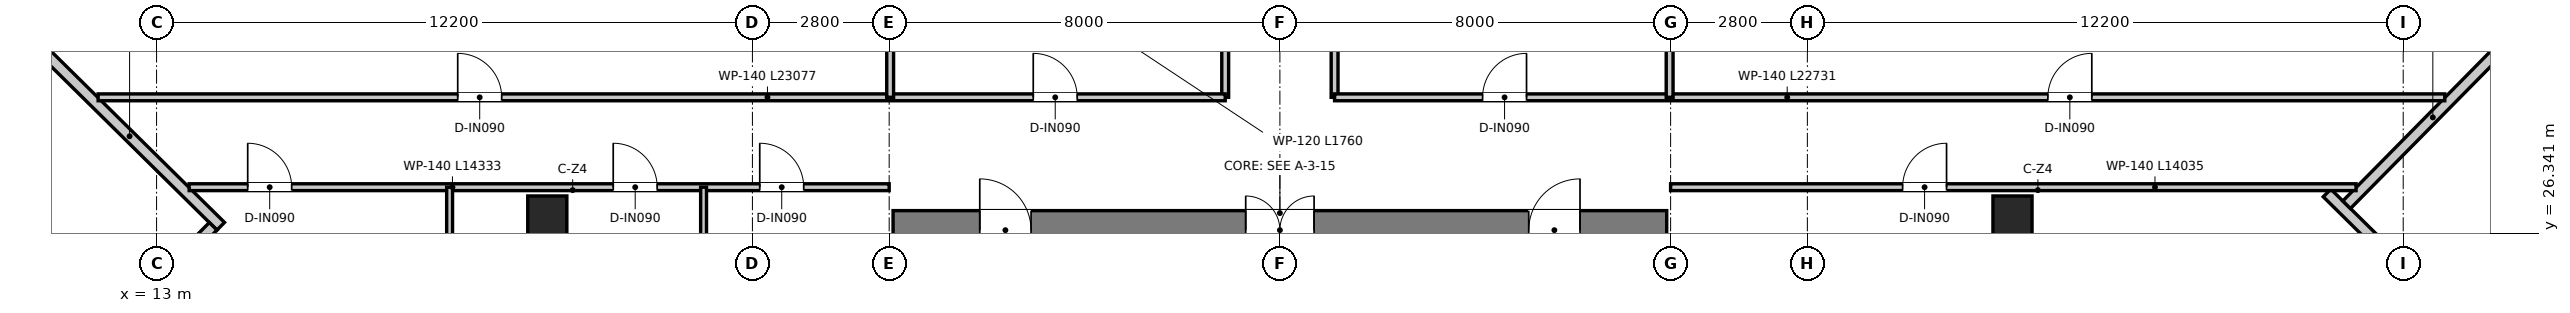
"""IFC4 building model, lengths in metres.
Left out: names, types, materials, properties, quantities, classifications, styles, units other than length and angle.
Written with IfcOpenShell. Run it as: python <this file> out.ifc"""

import sys

from ifc_helpers import new_model, si_unit, direction, frame, frame_2d, origin, origin_2d, place, context, subcontext, project, spatial, rectangle, extrude, source, transform, mapped, element, fill, save


model = new_model("IFC4")
c1 = context("Model", 3, precision=1e-05, world=origin(), true_north=direction((0.0, 1.0)))
c2 = subcontext(c1, "Body", "Model", "MODEL_VIEW")
j1 = project(units=[si_unit("LENGTHUNIT", "METRE"), si_unit("PLANEANGLEUNIT", "RADIAN")], contexts=[c1])
p1 = place(None, origin())
s1 = spatial("IfcSite", under=j1, at=p1, CompositionType="ELEMENT")
p2 = place(p1, origin())
s2 = spatial("IfcBuilding", under=s1, at=p2, CompositionType="ELEMENT")
p3 = place(p2, frame((0.0, 0.0, 231.0)))
s3 = spatial("IfcBuildingStorey", under=s2, at=p3, CompositionType="ELEMENT", Elevation=231.0)
p4 = place(p3, frame((28.08, 26.4, 0.0), z_axis=(0.0, 0.0, 1.0), x_axis=(1.0, 0.0, 0.0)))
e1 = element("IfcWall", 1, at=p4, inside=s3, PredefinedType="SHEAR", context=c2, shape_type="SweptSolid", body=[
    extrude(rectangle(XDim=15.84, YDim=0.8, at=frame_2d((7.92, 0.0))), origin(), (0.0, 0.0, 1.0), 3.95),
])
p5 = place(p4, frame((7.22, 0.0, 0.0)))
e2 = element("IfcOpeningElement", 2, at=p5, cuts=e1, PredefinedType="OPENING", context=c2, shape_type="SweptSolid", body=[
    extrude(rectangle(XDim=1.4, YDim=2.2, at=frame_2d((0.7, 1.1))), frame((0.0, 0.41, 0.0), z_axis=(0.0, -1.0, 0.0), x_axis=(1.0, 0.0, 0.0)), (0.0, 0.0, 1.0), 0.82),
])
p6 = place(p4, frame((1.775, 0.0, 0.0)))
e3 = element("IfcOpeningElement", 3, at=p6, cuts=e1, PredefinedType="OPENING", context=c2, shape_type="SweptSolid", body=[
    extrude(rectangle(XDim=1.05, YDim=2.1, at=frame_2d((0.525, 1.05))), frame((0.0, 0.41, 0.0), z_axis=(0.0, -1.0, 0.0), x_axis=(1.0, 0.0, 0.0)), (0.0, 0.0, 1.0), 0.82),
])
p7 = place(p4, frame((13.015, 0.0, 0.0)))
e4 = element("IfcOpeningElement", 4, at=p7, cuts=e1, PredefinedType="OPENING", context=c2, shape_type="SweptSolid", body=[
    extrude(rectangle(XDim=1.05, YDim=2.1, at=frame_2d((0.525, 1.05))), frame((0.0, 0.41, 0.0), z_axis=(0.0, -1.0, 0.0), x_axis=(1.0, 0.0, 0.0)), (0.0, 0.0, 1.0), 0.82),
])
m1 = source(origin(), c2, "Body", "SweptSolid", [
    extrude(rectangle(XDim=0.8, YDim=0.8, at=origin_2d()), origin(), (0.0, 0.0, 1.0), 3.95),
])
for number, where, z_axis, x_axis in (
    (5, (21.0, 26.7, 0.0), (0.0, 0.0, 1.0), (1.0, 0.0, 0.0)),
    (6, (51.0, 26.7, 0.0), (0.0, 0.0, 1.0), (1.0, 0.0, 0.0)),
):
    element("IfcColumn", number, at=place(p3, frame(where, z_axis=z_axis, x_axis=x_axis)), inside=s3, PredefinedType="COLUMN", context=c2, shape_type="MappedRepresentation", body=[
        mapped(m1, transform((0.0, 0.0, 0.0), x_axis=(1.0, 0.0, 0.0), y_axis=(0.0, 1.0, 0.0), z_axis=(0.0, 0.0, 1.0), scale=1.0)),
    ])
p8 = place(p3, frame((10.581, 30.165, 0.0), z_axis=(0.0, 0.0, 1.0), x_axis=(0.711699894533, -0.702483636906, 0.0)))
e7 = element("IfcWall", 7, at=p8, inside=s3, PredefinedType="ELEMENTEDWALL", context=c2, shape_type="SweptSolid", body=[
    extrude(rectangle(XDim=5.245, YDim=0.22, at=frame_2d((2.623, 0.0))), origin(), (0.0, 0.0, 1.0), 3.67),
])
p9 = place(p3, frame((14.158, 26.479, 0.0), z_axis=(0.0, 0.0, 1.0), x_axis=(-0.702451626199, -0.711731489292, 0.0)))
e8 = element("IfcWall", 8, at=p9, inside=s3, PredefinedType="ELEMENTEDWALL", context=c2, shape_type="SweptSolid", body=[
    extrude(rectangle(XDim=5.025, YDim=0.22, at=frame_2d((2.512, 0.0))), origin(), (0.0, 0.0, 1.0), 3.67),
])
p10 = place(p3, frame((61.419, 23.235, 0.0), z_axis=(0.0, 0.0, 1.0), x_axis=(-0.711721132709, 0.702462119446, 0.0)))
e9 = element("IfcWall", 9, at=p10, inside=s3, PredefinedType="ELEMENTEDWALL", context=c2, shape_type="SweptSolid", body=[
    extrude(rectangle(XDim=5.59, YDim=0.22, at=frame_2d((2.795, 0.0))), origin(), (0.0, 0.0, 1.0), 3.67),
])
p11 = place(p3, frame((57.842, 26.921, 0.0), z_axis=(0.0, 0.0, 1.0), x_axis=(0.702451626199, 0.711731489292, 0.0)))
e10 = element("IfcWall", 10, at=p11, inside=s3, PredefinedType="ELEMENTEDWALL", context=c2, shape_type="SweptSolid", body=[
    extrude(rectangle(XDim=5.025, YDim=0.22, at=frame_2d((2.512, 0.0))), origin(), (0.0, 0.0, 1.0), 3.67),
])
p12 = place(p3, frame((34.88, 29.12, 0.0), z_axis=(0.0, 0.0, 1.0), x_axis=(0.0, 1.0, 0.0)))
e11 = element("IfcWall", 11, at=p12, inside=s3, PredefinedType="PARTITIONING", context=c2, shape_type="SweptSolid", body=[
    extrude(rectangle(XDim=11.76, YDim=0.14, at=frame_2d((5.88, 0.0))), origin(), (0.0, 0.0, 1.0), 3.03),
])
p13 = place(p12, frame((4.085, 0.0, 0.0)))
e12 = element("IfcOpeningElement", 12, at=p13, cuts=e11, PredefinedType="OPENING", context=c2, shape_type="SweptSolid", body=[
    extrude(rectangle(XDim=0.95, YDim=2.1, at=frame_2d((0.475, 1.05))), frame((0.0, 0.08, 0.0), z_axis=(0.0, -1.0, 0.0), x_axis=(1.0, 0.0, 0.0)), (0.0, 0.0, 1.0), 0.16),
])
p14 = place(p12, frame((6.82, 0.0, 0.0)))
e13 = element("IfcOpeningElement", 13, at=p14, cuts=e11, PredefinedType="OPENING", context=c2, shape_type="SweptSolid", body=[
    extrude(rectangle(XDim=0.9, YDim=2.1, at=frame_2d((0.45, 1.05))), frame((0.0, 0.08, 0.0), z_axis=(0.0, -1.0, 0.0), x_axis=(1.0, 0.0, 0.0)), (0.0, 0.0, 1.0), 0.16),
])
p15 = place(p12, frame((9.83, 0.0, 0.0)))
e14 = element("IfcOpeningElement", 14, at=p15, cuts=e11, PredefinedType="OPENING", context=c2, shape_type="SweptSolid", body=[
    extrude(rectangle(XDim=0.9, YDim=2.1, at=frame_2d((0.45, 1.05))), frame((0.0, 0.08, 0.0), z_axis=(0.0, -1.0, 0.0), x_axis=(1.0, 0.0, 0.0)), (0.0, 0.0, 1.0), 0.16),
])
p16 = place(p3, frame((37.12, 29.12, 0.0), z_axis=(0.0, 0.0, 1.0), x_axis=(0.0, 1.0, 0.0)))
e15 = element("IfcWall", 15, at=p16, inside=s3, PredefinedType="PARTITIONING", context=c2, shape_type="SweptSolid", body=[
    extrude(rectangle(XDim=11.76, YDim=0.14, at=frame_2d((5.88, 0.0))), origin(), (0.0, 0.0, 1.0), 3.03),
])
p17 = place(p16, frame((3.205, 0.0, 0.0)))
e16 = element("IfcOpeningElement", 16, at=p17, cuts=e15, PredefinedType="OPENING", context=c2, shape_type="SweptSolid", body=[
    extrude(rectangle(XDim=0.95, YDim=2.1, at=frame_2d((0.475, 1.05))), frame((0.0, 0.08, 0.0), z_axis=(0.0, -1.0, 0.0), x_axis=(1.0, 0.0, 0.0)), (0.0, 0.0, 1.0), 0.16),
])
p18 = place(p16, frame((8.02, 0.0, 0.0)))
e17 = element("IfcOpeningElement", 17, at=p18, cuts=e15, PredefinedType="OPENING", context=c2, shape_type="SweptSolid", body=[
    extrude(rectangle(XDim=0.9, YDim=2.1, at=frame_2d((0.45, 1.05))), frame((0.0, 0.08, 0.0), z_axis=(0.0, -1.0, 0.0), x_axis=(1.0, 0.0, 0.0)), (0.0, 0.0, 1.0), 0.16),
])
p19 = place(p3, frame((11.803, 29.12, 0.0), z_axis=(0.0, 0.0, 1.0), x_axis=(1.0, 0.0, 0.0)))
e18 = element("IfcWall", 18, at=p19, inside=s3, PredefinedType="PARTITIONING", context=c2, shape_type="SweptSolid", body=[
    extrude(rectangle(XDim=23.077, YDim=0.14, at=frame_2d((11.538, 0.0))), origin(), (0.0, 0.0, 1.0), 3.03),
])
p20 = place(p19, frame((19.147, 0.0, 0.0)))
e19 = element("IfcOpeningElement", 19, at=p20, cuts=e18, PredefinedType="OPENING", context=c2, shape_type="SweptSolid", body=[
    extrude(rectangle(XDim=0.9, YDim=2.1, at=frame_2d((0.45, 1.05))), frame((0.0, 0.08, 0.0), z_axis=(0.0, -1.0, 0.0), x_axis=(1.0, 0.0, 0.0)), (0.0, 0.0, 1.0), 0.16),
])
p21 = place(p19, frame((7.363, 0.0, 0.0)))
e20 = element("IfcOpeningElement", 20, at=p21, cuts=e18, PredefinedType="OPENING", context=c2, shape_type="SweptSolid", body=[
    extrude(rectangle(XDim=0.9, YDim=2.1, at=frame_2d((0.45, 1.05))), frame((0.0, 0.08, 0.0), z_axis=(0.0, -1.0, 0.0), x_axis=(1.0, 0.0, 0.0)), (0.0, 0.0, 1.0), 0.16),
])
p22 = place(p3, frame((37.12, 29.12, 0.0), z_axis=(0.0, 0.0, 1.0), x_axis=(1.0, 0.0, 0.0)))
e21 = element("IfcWall", 21, at=p22, inside=s3, PredefinedType="PARTITIONING", context=c2, shape_type="SweptSolid", body=[
    extrude(rectangle(XDim=22.73, YDim=0.14, at=frame_2d((11.365, 0.0))), origin(), (0.0, 0.0, 1.0), 3.03),
])
p23 = place(p22, frame((3.03, 0.0, 0.0)))
e22 = element("IfcOpeningElement", 22, at=p23, cuts=e21, PredefinedType="OPENING", context=c2, shape_type="SweptSolid", body=[
    extrude(rectangle(XDim=0.9, YDim=2.1, at=frame_2d((0.45, 1.05))), frame((0.0, 0.08, 0.0), z_axis=(0.0, -1.0, 0.0), x_axis=(1.0, 0.0, 0.0)), (0.0, 0.0, 1.0), 0.16),
])
p24 = place(p22, frame((14.604, 0.0, 0.0)))
e23 = element("IfcOpeningElement", 23, at=p24, cuts=e21, PredefinedType="OPENING", context=c2, shape_type="SweptSolid", body=[
    extrude(rectangle(XDim=0.9, YDim=2.1, at=frame_2d((0.45, 1.05))), frame((0.0, 0.08, 0.0), z_axis=(0.0, -1.0, 0.0), x_axis=(1.0, 0.0, 0.0)), (0.0, 0.0, 1.0), 0.16),
])
p25 = place(p3, frame((13.667, 27.28, 0.0), z_axis=(0.0, 0.0, 1.0), x_axis=(1.0, 0.0, 0.0)))
e24 = element("IfcWall", 24, at=p25, inside=s3, PredefinedType="PARTITIONING", context=c2, shape_type="SweptSolid", body=[
    extrude(rectangle(XDim=14.333, YDim=0.14, at=frame_2d((7.166, 0.0))), origin(), (0.0, 0.0, 1.0), 3.03),
])
p26 = place(p25, frame((1.198, 0.0, 0.0)))
e25 = element("IfcOpeningElement", 25, at=p26, cuts=e24, PredefinedType="OPENING", context=c2, shape_type="SweptSolid", body=[
    extrude(rectangle(XDim=0.9, YDim=2.1, at=frame_2d((0.45, 1.05))), frame((0.0, 0.08, 0.0), z_axis=(0.0, -1.0, 0.0), x_axis=(1.0, 0.0, 0.0)), (0.0, 0.0, 1.0), 0.16),
])
p27 = place(p25, frame((8.683, 0.0, 0.0)))
e26 = element("IfcOpeningElement", 26, at=p27, cuts=e24, PredefinedType="OPENING", context=c2, shape_type="SweptSolid", body=[
    extrude(rectangle(XDim=0.9, YDim=2.1, at=frame_2d((0.45, 1.05))), frame((0.0, 0.08, 0.0), z_axis=(0.0, -1.0, 0.0), x_axis=(1.0, 0.0, 0.0)), (0.0, 0.0, 1.0), 0.16),
])
p28 = place(p25, frame((11.683, 0.0, 0.0)))
e27 = element("IfcOpeningElement", 27, at=p28, cuts=e24, PredefinedType="OPENING", context=c2, shape_type="SweptSolid", body=[
    extrude(rectangle(XDim=0.9, YDim=2.1, at=frame_2d((0.45, 1.05))), frame((0.0, 0.08, 0.0), z_axis=(0.0, -1.0, 0.0), x_axis=(1.0, 0.0, 0.0)), (0.0, 0.0, 1.0), 0.16),
])
p29 = place(p3, frame((44.0, 27.28, 0.0), z_axis=(0.0, 0.0, 1.0), x_axis=(1.0, 0.0, 0.0)))
e28 = element("IfcWall", 28, at=p29, inside=s3, PredefinedType="PARTITIONING", context=c2, shape_type="SweptSolid", body=[
    extrude(rectangle(XDim=14.035, YDim=0.14, at=frame_2d((7.017, 0.0))), origin(), (0.0, 0.0, 1.0), 3.03),
])
p30 = place(p29, frame((4.75, 0.0, 0.0)))
e29 = element("IfcOpeningElement", 29, at=p30, cuts=e28, PredefinedType="OPENING", context=c2, shape_type="SweptSolid", body=[
    extrude(rectangle(XDim=0.9, YDim=2.1, at=frame_2d((0.45, 1.05))), frame((0.0, 0.08, 0.0), z_axis=(0.0, -1.0, 0.0), x_axis=(1.0, 0.0, 0.0)), (0.0, 0.0, 1.0), 0.16),
])
for number, where, z_axis, x_axis in (
    (30, (28.02, 29.12, 0.0), (0.0, 0.0, 1.0), (0.0, 1.0, 0.0)),
    (31, (43.98, 29.12, 0.0), (0.0, 0.0, 1.0), (0.0, 1.0, 0.0)),
):
    element("IfcWall", number, at=place(p3, frame(where, z_axis=z_axis, x_axis=x_axis)), inside=s3, PredefinedType="PARTITIONING", context=c2, shape_type="SweptSolid", body=[
        extrude(rectangle(XDim=5.46, YDim=0.14, at=frame_2d((2.73, 0.0))), origin(), (0.0, 0.0, 1.0), 3.37),
    ])
p31 = place(p3, frame((19.0, 14.802, 0.0), z_axis=(0.0, 0.0, 1.0), x_axis=(0.0, 1.0, 0.0)))
e32 = element("IfcWall", 32, at=p31, inside=s3, PredefinedType="PARTITIONING", context=c2, shape_type="SweptSolid", body=[
    extrude(rectangle(XDim=12.478, YDim=0.12, at=frame_2d((6.239, 0.0))), origin(), (0.0, 0.0, 1.0), 3.67),
])
p32 = place(p3, frame((24.2, 9.669, 0.0), z_axis=(0.0, 0.0, 1.0), x_axis=(0.0, 1.0, 0.0)))
e33 = element("IfcWall", 33, at=p32, inside=s3, PredefinedType="PARTITIONING", context=c2, shape_type="SweptSolid", body=[
    extrude(rectangle(XDim=17.611, YDim=0.12, at=frame_2d((8.805, 0.0))), origin(), (0.0, 0.0, 1.0), 3.18),
])
p33 = place(p5, origin())
e34 = element("IfcDoor", 34, at=p33, inside=s3, OperationType="DOUBLE_DOOR_SINGLE_SWING", PredefinedType="DOOR", context=c2, shape_type="SweptSolid", body=[
    extrude(rectangle(XDim=1.4, YDim=2.2, at=frame_2d((0.7, 1.1))), frame((0.0, 0.025, 0.0), z_axis=(0.0, -1.0, 0.0), x_axis=(1.0, 0.0, 0.0)), (0.0, 0.0, 1.0), 0.05),
])
fill(e2, e34)
p34 = place(p6, origin())
e35 = element("IfcDoor", 35, at=p34, inside=s3, OperationType="SINGLE_SWING_LEFT", PredefinedType="DOOR", context=c2, shape_type="SweptSolid", body=[
    extrude(rectangle(XDim=1.05, YDim=2.1, at=frame_2d((0.525, 1.05))), frame((0.0, 0.025, 0.0), z_axis=(0.0, -1.0, 0.0), x_axis=(1.0, 0.0, 0.0)), (0.0, 0.0, 1.0), 0.05),
])
fill(e3, e35)
p35 = place(p7, origin())
e36 = element("IfcDoor", 36, at=p35, inside=s3, OperationType="SINGLE_SWING_RIGHT", PredefinedType="DOOR", context=c2, shape_type="SweptSolid", body=[
    extrude(rectangle(XDim=1.05, YDim=2.1, at=frame_2d((0.525, 1.05))), frame((0.0, 0.025, 0.0), z_axis=(0.0, -1.0, 0.0), x_axis=(1.0, 0.0, 0.0)), (0.0, 0.0, 1.0), 0.05),
])
fill(e4, e36)
p36 = place(p20, origin())
e37 = element("IfcDoor", 37, at=p36, inside=s3, OperationType="SINGLE_SWING_LEFT", PredefinedType="DOOR", context=c2, shape_type="SweptSolid", body=[
    extrude(rectangle(XDim=0.9, YDim=2.1, at=frame_2d((0.45, 1.05))), frame((0.0, 0.025, 0.0), z_axis=(0.0, -1.0, 0.0), x_axis=(1.0, 0.0, 0.0)), (0.0, 0.0, 1.0), 0.05),
])
fill(e19, e37)
p37 = place(p23, origin())
e38 = element("IfcDoor", 38, at=p37, inside=s3, OperationType="SINGLE_SWING_RIGHT", PredefinedType="DOOR", context=c2, shape_type="SweptSolid", body=[
    extrude(rectangle(XDim=0.9, YDim=2.1, at=frame_2d((0.45, 1.05))), frame((0.0, 0.025, 0.0), z_axis=(0.0, -1.0, 0.0), x_axis=(1.0, 0.0, 0.0)), (0.0, 0.0, 1.0), 0.05),
])
fill(e22, e38)
p38 = place(p21, origin())
e39 = element("IfcDoor", 39, at=p38, inside=s3, OperationType="SINGLE_SWING_LEFT", PredefinedType="DOOR", context=c2, shape_type="SweptSolid", body=[
    extrude(rectangle(XDim=0.9, YDim=2.1, at=frame_2d((0.45, 1.05))), frame((0.0, 0.025, 0.0), z_axis=(0.0, -1.0, 0.0), x_axis=(1.0, 0.0, 0.0)), (0.0, 0.0, 1.0), 0.05),
])
fill(e20, e39)
p39 = place(p24, origin())
e40 = element("IfcDoor", 40, at=p39, inside=s3, OperationType="SINGLE_SWING_RIGHT", PredefinedType="DOOR", context=c2, shape_type="SweptSolid", body=[
    extrude(rectangle(XDim=0.9, YDim=2.1, at=frame_2d((0.45, 1.05))), frame((0.0, 0.025, 0.0), z_axis=(0.0, -1.0, 0.0), x_axis=(1.0, 0.0, 0.0)), (0.0, 0.0, 1.0), 0.05),
])
fill(e23, e40)
p40 = place(p26, origin())
e41 = element("IfcDoor", 41, at=p40, inside=s3, OperationType="SINGLE_SWING_LEFT", PredefinedType="DOOR", context=c2, shape_type="SweptSolid", body=[
    extrude(rectangle(XDim=0.9, YDim=2.1, at=frame_2d((0.45, 1.05))), frame((0.0, 0.025, 0.0), z_axis=(0.0, -1.0, 0.0), x_axis=(1.0, 0.0, 0.0)), (0.0, 0.0, 1.0), 0.05),
])
fill(e25, e41)
p41 = place(p27, origin())
e42 = element("IfcDoor", 42, at=p41, inside=s3, OperationType="SINGLE_SWING_LEFT", PredefinedType="DOOR", context=c2, shape_type="SweptSolid", body=[
    extrude(rectangle(XDim=0.9, YDim=2.1, at=frame_2d((0.45, 1.05))), frame((0.0, 0.025, 0.0), z_axis=(0.0, -1.0, 0.0), x_axis=(1.0, 0.0, 0.0)), (0.0, 0.0, 1.0), 0.05),
])
fill(e26, e42)
p42 = place(p28, origin())
e43 = element("IfcDoor", 43, at=p42, inside=s3, OperationType="SINGLE_SWING_LEFT", PredefinedType="DOOR", context=c2, shape_type="SweptSolid", body=[
    extrude(rectangle(XDim=0.9, YDim=2.1, at=frame_2d((0.45, 1.05))), frame((0.0, 0.025, 0.0), z_axis=(0.0, -1.0, 0.0), x_axis=(1.0, 0.0, 0.0)), (0.0, 0.0, 1.0), 0.05),
])
fill(e27, e43)
p43 = place(p30, origin())
e44 = element("IfcDoor", 44, at=p43, inside=s3, OperationType="SINGLE_SWING_RIGHT", PredefinedType="DOOR", context=c2, shape_type="SweptSolid", body=[
    extrude(rectangle(XDim=0.9, YDim=2.1, at=frame_2d((0.45, 1.05))), frame((0.0, 0.025, 0.0), z_axis=(0.0, -1.0, 0.0), x_axis=(1.0, 0.0, 0.0)), (0.0, 0.0, 1.0), 0.05),
])
fill(e29, e44)
save(model, sys.argv[1])
